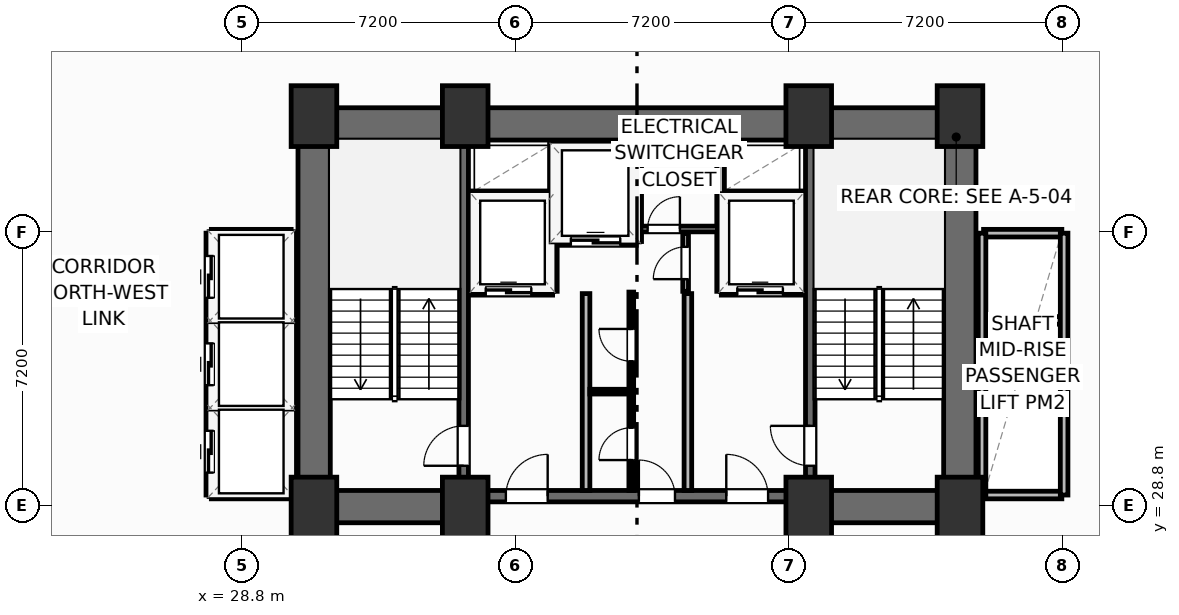
"""IFC4 building model, lengths in metres.
Left out: names, types, materials, properties, quantities, classifications, styles, units other than length and angle.
Written with IfcOpenShell. Run it as: python <this file> out.ifc"""

import sys

from ifc_helpers import new_model, si_unit, direction, frame, frame_2d, origin, origin_2d, place, context, subcontext, project, spatial, rectangle, extrude, element, fill, save


model = new_model("IFC4")
c1 = context("Model", 3, precision=1e-05, world=origin(), true_north=direction((0.0, 1.0)))
c2 = subcontext(c1, "Body", "Model", "MODEL_VIEW")
j1 = project(units=[si_unit("LENGTHUNIT", "METRE"), si_unit("PLANEANGLEUNIT", "RADIAN")], contexts=[c1])
p1 = place(None, origin())
s1 = spatial("IfcSite", under=j1, at=p1, CompositionType="ELEMENT")
p2 = place(p1, origin())
s2 = spatial("IfcBuilding", under=s1, at=p2, CompositionType="ELEMENT")
p3 = place(p2, frame((0.0, 0.0, 64.0)))
s3 = spatial("IfcBuildingStorey", under=s2, at=p3, CompositionType="ELEMENT", Elevation=64.0)
for number, where, z_axis, x_axis in (
    (1, (30.7, 28.75, 0.0), (0.0, 0.0, 1.0), (1.0, 0.0, 0.0)),
    (2, (34.68, 28.75, 0.0), (0.0, 0.0, 1.0), (1.0, 0.0, 0.0)),
    (3, (43.72, 28.75, 0.0), (0.0, 0.0, 1.0), (1.0, 0.0, 0.0)),
    (4, (47.7, 28.75, 0.0), (0.0, 0.0, 1.0), (1.0, 0.0, 0.0)),
    (5, (30.7, 39.05, 0.0), (0.0, 0.0, 1.0), (1.0, 0.0, 0.0)),
    (6, (34.68, 39.05, 0.0), (0.0, 0.0, 1.0), (1.0, 0.0, 0.0)),
    (7, (43.72, 39.05, 0.0), (0.0, 0.0, 1.0), (1.0, 0.0, 0.0)),
    (8, (47.7, 39.05, 0.0), (0.0, 0.0, 1.0), (1.0, 0.0, 0.0)),
):
    element("IfcColumn", number, at=place(p3, frame(where, z_axis=z_axis, x_axis=x_axis)), inside=s3, PredefinedType="COLUMN", context=c2, shape_type="SweptSolid", body=[
        extrude(rectangle(XDim=1.2, YDim=1.6, at=origin_2d()), origin(), (0.0, 0.0, 1.0), 3.7),
    ])
p4 = place(p3, frame((30.28, 38.845, 0.0), z_axis=(0.0, 0.0, 1.0), x_axis=(1.0, 0.0, 0.0)))
e9 = element("IfcWall", 9, at=p4, inside=s3, PredefinedType="SHEAR", context=c2, shape_type="SweptSolid", body=[
    extrude(rectangle(XDim=17.84, YDim=0.85, at=frame_2d((8.92, 0.0))), origin(), (0.0, 0.0, 1.0), 3.45),
])
for number, where, z_axis, x_axis in (
    (10, (30.705, 29.2, 0.0), (0.0, 0.0, 1.0), (0.0, 1.0, 0.0)),
    (11, (47.695, 29.2, 0.0), (0.0, 0.0, 1.0), (0.0, 1.0, 0.0)),
):
    element("IfcWall", number, at=place(p3, frame(where, z_axis=z_axis, x_axis=x_axis)), inside=s3, PredefinedType="SHEAR", context=c2, shape_type="SweptSolid", body=[
        extrude(rectangle(XDim=9.22, YDim=0.85, at=frame_2d((4.61, 0.0))), origin(), (0.0, 0.0, 1.0), 3.45),
    ])
for number, where, z_axis, x_axis in (
    (12, (30.28, 28.775, 0.0), (0.0, 0.0, 1.0), (1.0, 0.0, 0.0)),
    (13, (43.6, 28.775, 0.0), (0.0, 0.0, 1.0), (1.0, 0.0, 0.0)),
):
    element("IfcWall", number, at=place(p3, frame(where, z_axis=z_axis, x_axis=x_axis)), inside=s3, PredefinedType="SHEAR", context=c2, shape_type="SweptSolid", body=[
        extrude(rectangle(XDim=4.52, YDim=0.85, at=frame_2d((2.26, 0.0))), origin(), (0.0, 0.0, 1.0), 3.45),
    ])
p5 = place(p3, frame((34.8, 29.05, 0.0), z_axis=(0.0, 0.0, 1.0), x_axis=(1.0, 0.0, 0.0)))
e14 = element("IfcWall", 14, at=p5, inside=s3, PredefinedType="SHEAR", context=c2, shape_type="SweptSolid", body=[
    extrude(rectangle(XDim=8.8, YDim=0.3, at=frame_2d((4.4, 0.0))), origin(), (0.0, 0.0, 1.0), 3.45),
])
p6 = place(p5, frame((0.95, 0.0, 0.0)))
e15 = element("IfcOpeningElement", 15, at=p6, cuts=e14, PredefinedType="OPENING", context=c2, shape_type="SweptSolid", body=[
    extrude(rectangle(XDim=1.1, YDim=2.15, at=frame_2d((0.55, 1.075))), frame((0.0, 0.16, 0.0), z_axis=(0.0, -1.0, 0.0), x_axis=(1.0, 0.0, 0.0)), (0.0, 0.0, 1.0), 0.32),
])
p7 = place(p5, frame((6.75, 0.0, 0.0)))
e16 = element("IfcOpeningElement", 16, at=p7, cuts=e14, PredefinedType="OPENING", context=c2, shape_type="SweptSolid", body=[
    extrude(rectangle(XDim=1.1, YDim=2.15, at=frame_2d((0.55, 1.075))), frame((0.0, 0.16, 0.0), z_axis=(0.0, -1.0, 0.0), x_axis=(1.0, 0.0, 0.0)), (0.0, 0.0, 1.0), 0.32),
])
p8 = place(p5, frame((4.45, 0.0, 0.0)))
e17 = element("IfcOpeningElement", 17, at=p8, cuts=e14, PredefinedType="OPENING", context=c2, shape_type="SweptSolid", body=[
    extrude(rectangle(XDim=0.95, YDim=2.15, at=frame_2d((0.475, 1.075))), frame((0.0, 0.16, 0.0), z_axis=(0.0, -1.0, 0.0), x_axis=(1.0, 0.0, 0.0)), (0.0, 0.0, 1.0), 0.32),
])
p9 = place(p3, frame((34.64, 29.2, 0.0), z_axis=(0.0, 0.0, 1.0), x_axis=(0.0, 1.0, 0.0)))
e18 = element("IfcWall", 18, at=p9, inside=s3, PredefinedType="SHEAR", context=c2, shape_type="SweptSolid", body=[
    extrude(rectangle(XDim=9.22, YDim=0.25, at=frame_2d((4.61, 0.0))), origin(), (0.0, 0.0, 1.0), 3.45),
])
p10 = place(p9, frame((0.65, 0.0, 0.0)))
e19 = element("IfcOpeningElement", 19, at=p10, cuts=e18, PredefinedType="OPENING", context=c2, shape_type="SweptSolid", body=[
    extrude(rectangle(XDim=1.05, YDim=2.15, at=frame_2d((0.525, 1.075))), frame((0.0, 0.135, 0.0), z_axis=(0.0, -1.0, 0.0), x_axis=(1.0, 0.0, 0.0)), (0.0, 0.0, 1.0), 0.27),
])
p11 = place(p3, frame((43.76, 29.2, 0.0), z_axis=(0.0, 0.0, 1.0), x_axis=(0.0, 1.0, 0.0)))
e20 = element("IfcWall", 20, at=p11, inside=s3, PredefinedType="SHEAR", context=c2, shape_type="SweptSolid", body=[
    extrude(rectangle(XDim=9.22, YDim=0.25, at=frame_2d((4.61, 0.0))), origin(), (0.0, 0.0, 1.0), 3.45),
])
p12 = place(p11, frame((0.65, 0.0, 0.0)))
e21 = element("IfcOpeningElement", 21, at=p12, cuts=e20, PredefinedType="OPENING", context=c2, shape_type="SweptSolid", body=[
    extrude(rectangle(XDim=1.05, YDim=2.15, at=frame_2d((0.525, 1.075))), frame((0.0, 0.135, 0.0), z_axis=(0.0, -1.0, 0.0), x_axis=(1.0, 0.0, 0.0)), (0.0, 0.0, 1.0), 0.27),
])
for number, where, z_axis, x_axis in (
    (22, (37.86, 29.2, 0.0), (0.0, 0.0, 1.0), (0.0, 1.0, 0.0)),
    (23, (40.54, 29.2, 0.0), (0.0, 0.0, 1.0), (0.0, 1.0, 0.0)),
):
    element("IfcWall", number, at=place(p3, frame(where, z_axis=z_axis, x_axis=x_axis)), inside=s3, PredefinedType="PARTITIONING", context=c2, shape_type="SweptSolid", body=[
        extrude(rectangle(XDim=5.18, YDim=0.2, at=frame_2d((2.59, 0.0))), origin(), (0.0, 0.0, 1.0), 3.45),
    ])
p13 = place(p3, frame((34.8, 34.44, 0.0), z_axis=(0.0, 0.0, 1.0), x_axis=(1.0, 0.0, 0.0)))
e24 = element("IfcWall", 24, at=p13, inside=s3, PredefinedType="PARTITIONING", context=c2, shape_type="SweptSolid", body=[
    extrude(rectangle(XDim=2.18, YDim=0.2, at=frame_2d((1.09, 0.0))), origin(), (0.0, 0.0, 1.0), 3.45),
])
p14 = place(p13, frame((0.42, 0.0, 0.0)))
e25 = element("IfcOpeningElement", 25, at=p14, cuts=e24, PredefinedType="OPENING", context=c2, shape_type="SweptSolid", body=[
    extrude(rectangle(XDim=1.2, YDim=2.2, at=frame_2d((0.6, 1.1))), frame((0.0, 0.11, 0.0), z_axis=(0.0, -1.0, 0.0), x_axis=(1.0, 0.0, 0.0)), (0.0, 0.0, 1.0), 0.22),
])
p15 = place(p3, frame((34.8, 36.98, 0.0), z_axis=(0.0, 0.0, 1.0), x_axis=(1.0, 0.0, 0.0)))
e26 = element("IfcWall", 26, at=p15, inside=s3, PredefinedType="PARTITIONING", context=c2, shape_type="SweptSolid", body=[
    extrude(rectangle(XDim=2.18, YDim=0.2, at=frame_2d((1.09, 0.0))), origin(), (0.0, 0.0, 1.0), 3.45),
])
p16 = place(p3, frame((37.0, 34.44, 0.0), z_axis=(0.0, 0.0, 1.0), x_axis=(0.0, 1.0, 0.0)))
e27 = element("IfcWall", 27, at=p16, inside=s3, PredefinedType="PARTITIONING", context=c2, shape_type="SweptSolid", body=[
    extrude(rectangle(XDim=3.9, YDim=0.2, at=frame_2d((1.95, 0.0))), origin(), (0.0, 0.0, 1.0), 3.45),
])
p17 = place(p3, frame((41.42, 34.44, 0.0), z_axis=(0.0, 0.0, 1.0), x_axis=(1.0, 0.0, 0.0)))
e28 = element("IfcWall", 28, at=p17, inside=s3, PredefinedType="PARTITIONING", context=c2, shape_type="SweptSolid", body=[
    extrude(rectangle(XDim=2.18, YDim=0.2, at=frame_2d((1.09, 0.0))), origin(), (0.0, 0.0, 1.0), 3.45),
])
p18 = place(p17, frame((0.42, 0.0, 0.0)))
e29 = element("IfcOpeningElement", 29, at=p18, cuts=e28, PredefinedType="OPENING", context=c2, shape_type="SweptSolid", body=[
    extrude(rectangle(XDim=1.2, YDim=2.2, at=frame_2d((0.6, 1.1))), frame((0.0, 0.11, 0.0), z_axis=(0.0, -1.0, 0.0), x_axis=(1.0, 0.0, 0.0)), (0.0, 0.0, 1.0), 0.22),
])
p19 = place(p3, frame((41.42, 36.98, 0.0), z_axis=(0.0, 0.0, 1.0), x_axis=(1.0, 0.0, 0.0)))
e30 = element("IfcWall", 30, at=p19, inside=s3, PredefinedType="PARTITIONING", context=c2, shape_type="SweptSolid", body=[
    extrude(rectangle(XDim=2.18, YDim=0.2, at=frame_2d((1.09, 0.0))), origin(), (0.0, 0.0, 1.0), 3.45),
])
p20 = place(p3, frame((41.4, 34.44, 0.0), z_axis=(0.0, 0.0, 1.0), x_axis=(0.0, 1.0, 0.0)))
e31 = element("IfcWall", 31, at=p20, inside=s3, PredefinedType="PARTITIONING", context=c2, shape_type="SweptSolid", body=[
    extrude(rectangle(XDim=3.9, YDim=0.2, at=frame_2d((1.95, 0.0))), origin(), (0.0, 0.0, 1.0), 3.45),
])
p21 = place(p3, frame((37.06, 35.75, 0.0), z_axis=(0.0, 0.0, 1.0), x_axis=(1.0, 0.0, 0.0)))
e32 = element("IfcWall", 32, at=p21, inside=s3, PredefinedType="PARTITIONING", context=c2, shape_type="SweptSolid", body=[
    extrude(rectangle(XDim=2.12, YDim=0.2, at=frame_2d((1.06, 0.0))), origin(), (0.0, 0.0, 1.0), 3.45),
])
p22 = place(p21, frame((0.4, 0.0, 0.0)))
e33 = element("IfcOpeningElement", 33, at=p22, cuts=e32, PredefinedType="OPENING", context=c2, shape_type="SweptSolid", body=[
    extrude(rectangle(XDim=1.3, YDim=2.2, at=frame_2d((0.65, 1.1))), frame((0.0, 0.11, 0.0), z_axis=(0.0, -1.0, 0.0), x_axis=(1.0, 0.0, 0.0)), (0.0, 0.0, 1.0), 0.22),
])
p23 = place(p3, frame((39.22, 35.75, 0.0), z_axis=(0.0, 0.0, 1.0), x_axis=(0.0, 1.0, 0.0)))
e34 = element("IfcWall", 34, at=p23, inside=s3, PredefinedType="PARTITIONING", context=c2, shape_type="SweptSolid", body=[
    extrude(rectangle(XDim=2.59, YDim=0.2, at=frame_2d((1.295, 0.0))), origin(), (0.0, 0.0, 1.0), 3.45),
])
p24 = place(p3, frame((39.3, 36.08, 0.0), z_axis=(0.0, 0.0, 1.0), x_axis=(1.0, 0.0, 0.0)))
e35 = element("IfcWall", 35, at=p24, inside=s3, PredefinedType="PARTITIONING", context=c2, shape_type="SweptSolid", body=[
    extrude(rectangle(XDim=2.02, YDim=0.15, at=frame_2d((1.01, 0.0))), origin(), (0.0, 0.0, 1.0), 3.45),
])
p25 = place(p24, frame((0.18, 0.0, 0.0)))
e36 = element("IfcOpeningElement", 36, at=p25, cuts=e35, PredefinedType="OPENING", context=c2, shape_type="SweptSolid", body=[
    extrude(rectangle(XDim=0.85, YDim=2.05, at=frame_2d((0.425, 1.025))), frame((0.0, 0.085, 0.0), z_axis=(0.0, -1.0, 0.0), x_axis=(1.0, 0.0, 0.0)), (0.0, 0.0, 1.0), 0.17),
])
p26 = place(p3, frame((40.48, 34.44, 0.0), z_axis=(0.0, 0.0, 1.0), x_axis=(0.0, 1.0, 0.0)))
e37 = element("IfcWall", 37, at=p26, inside=s3, PredefinedType="PARTITIONING", context=c2, shape_type="SweptSolid", body=[
    extrude(rectangle(XDim=1.52, YDim=0.15, at=frame_2d((0.76, 0.0))), origin(), (0.0, 0.0, 1.0), 3.45),
])
p27 = place(p26, frame((0.32, 0.0, 0.0)))
e38 = element("IfcOpeningElement", 38, at=p27, cuts=e37, PredefinedType="OPENING", context=c2, shape_type="SweptSolid", body=[
    extrude(rectangle(XDim=0.85, YDim=2.05, at=frame_2d((0.425, 1.025))), frame((0.0, 0.085, 0.0), z_axis=(0.0, -1.0, 0.0), x_axis=(1.0, 0.0, 0.0)), (0.0, 0.0, 1.0), 0.17),
])
p28 = place(p3, frame((37.96, 31.8, 0.0), z_axis=(0.0, 0.0, 1.0), x_axis=(1.0, 0.0, 0.0)))
e39 = element("IfcWall", 39, at=p28, inside=s3, PredefinedType="PARTITIONING", context=c2, shape_type="SweptSolid", body=[
    extrude(rectangle(XDim=1.09, YDim=0.125, at=frame_2d((0.545, 0.0))), origin(), (0.0, 0.0, 1.0), 3.45),
])
p29 = place(p3, frame((39.05, 29.2, 0.0), z_axis=(0.0, 0.0, 1.0), x_axis=(0.0, 1.0, 0.0)))
e40 = element("IfcWall", 40, at=p29, inside=s3, PredefinedType="PARTITIONING", context=c2, shape_type="SweptSolid", body=[
    extrude(rectangle(XDim=5.22, YDim=0.125, at=frame_2d((2.61, 0.0))), origin(), (0.0, 0.0, 1.0), 3.45),
])
p30 = place(p29, frame((0.8, 0.0, 0.0)))
e41 = element("IfcOpeningElement", 41, at=p30, cuts=e40, PredefinedType="OPENING", context=c2, shape_type="SweptSolid", body=[
    extrude(rectangle(XDim=0.85, YDim=2.05, at=frame_2d((0.425, 1.025))), frame((0.0, 0.073, 0.0), z_axis=(0.0, -1.0, 0.0), x_axis=(1.0, 0.0, 0.0)), (0.0, 0.0, 1.0), 0.145),
])
p31 = place(p29, frame((3.4, 0.0, 0.0)))
e42 = element("IfcOpeningElement", 42, at=p31, cuts=e40, PredefinedType="OPENING", context=c2, shape_type="SweptSolid", body=[
    extrude(rectangle(XDim=0.85, YDim=2.05, at=frame_2d((0.425, 1.025))), frame((0.0, 0.073, 0.0), z_axis=(0.0, -1.0, 0.0), x_axis=(1.0, 0.0, 0.0)), (0.0, 0.0, 1.0), 0.145),
])
for number, where, z_axis, x_axis in (
    (43, (28.02, 31.375, 0.0), (0.0, 0.0, 1.0), (1.0, 0.0, 0.0)),
    (44, (28.02, 33.675, 0.0), (0.0, 0.0, 1.0), (1.0, 0.0, 0.0)),
):
    element("IfcWall", number, at=place(p3, frame(where, z_axis=z_axis, x_axis=x_axis)), inside=s3, PredefinedType="PARTITIONING", context=c2, shape_type="SweptSolid", body=[
        extrude(rectangle(XDim=2.06, YDim=0.2, at=frame_2d((1.03, 0.0))), origin(), (0.0, 0.0, 1.0), 3.45),
    ])
for number, where, z_axis, x_axis in (
    (45, (28.0, 29.08, 0.0), (0.0, 0.0, 1.0), (1.0, 0.0, 0.0)),
    (46, (28.0, 35.97, 0.0), (0.0, 0.0, 1.0), (1.0, 0.0, 0.0)),
):
    element("IfcWall", number, at=place(p3, frame(where, z_axis=z_axis, x_axis=x_axis)), inside=s3, PredefinedType="PARTITIONING", context=c2, shape_type="SweptSolid", body=[
        extrude(rectangle(XDim=2.1, YDim=0.2, at=frame_2d((1.05, 0.0))), origin(), (0.0, 0.0, 1.0), 3.45),
    ])
p32 = place(p3, frame((30.12, 29.08, 0.0), z_axis=(0.0, 0.0, 1.0), x_axis=(0.0, 1.0, 0.0)))
e47 = element("IfcWall", 47, at=p32, inside=s3, PredefinedType="PARTITIONING", context=c2, shape_type="SweptSolid", body=[
    extrude(rectangle(XDim=6.89, YDim=0.2, at=frame_2d((3.445, 0.0))), origin(), (0.0, 0.0, 1.0), 3.45),
])
p33 = place(p3, frame((27.96, 29.08, 0.0), z_axis=(0.0, 0.0, 1.0), x_axis=(0.0, 1.0, 0.0)))
e48 = element("IfcWall", 48, at=p33, inside=s3, PredefinedType="PARTITIONING", context=c2, shape_type="SweptSolid", body=[
    extrude(rectangle(XDim=6.89, YDim=0.2, at=frame_2d((3.445, 0.0))), origin(), (0.0, 0.0, 1.0), 3.45),
])
p34 = place(p33, frame((0.59, 0.0, 0.0)))
e49 = element("IfcOpeningElement", 49, at=p34, cuts=e48, PredefinedType="OPENING", context=c2, shape_type="SweptSolid", body=[
    extrude(rectangle(XDim=1.1, YDim=2.15, at=frame_2d((0.55, 1.075))), frame((0.0, 0.11, 0.0), z_axis=(0.0, -1.0, 0.0), x_axis=(1.0, 0.0, 0.0)), (0.0, 0.0, 1.0), 0.22),
])
p35 = place(p33, frame((2.89, 0.0, 0.0)))
e50 = element("IfcOpeningElement", 50, at=p35, cuts=e48, PredefinedType="OPENING", context=c2, shape_type="SweptSolid", body=[
    extrude(rectangle(XDim=1.1, YDim=2.15, at=frame_2d((0.55, 1.075))), frame((0.0, 0.11, 0.0), z_axis=(0.0, -1.0, 0.0), x_axis=(1.0, 0.0, 0.0)), (0.0, 0.0, 1.0), 0.22),
])
p36 = place(p33, frame((5.19, 0.0, 0.0)))
e51 = element("IfcOpeningElement", 51, at=p36, cuts=e48, PredefinedType="OPENING", context=c2, shape_type="SweptSolid", body=[
    extrude(rectangle(XDim=1.1, YDim=2.15, at=frame_2d((0.55, 1.075))), frame((0.0, 0.11, 0.0), z_axis=(0.0, -1.0, 0.0), x_axis=(1.0, 0.0, 0.0)), (0.0, 0.0, 1.0), 0.22),
])
for number, where, z_axis, x_axis in (
    (52, (48.32, 31.375, 0.0), (0.0, 0.0, 1.0), (1.0, 0.0, 0.0)),
    (53, (48.32, 33.675, 0.0), (0.0, 0.0, 1.0), (1.0, 0.0, 0.0)),
):
    element("IfcWall", number, at=place(p3, frame(where, z_axis=z_axis, x_axis=x_axis)), inside=s3, PredefinedType="PARTITIONING", context=c2, shape_type="SweptSolid", body=[
        extrude(rectangle(XDim=2.06, YDim=0.2, at=frame_2d((1.03, 0.0))), origin(), (0.0, 0.0, 1.0), 3.45),
    ])
p37 = place(p3, frame((48.32, 29.08, 0.0), z_axis=(0.0, 0.0, 1.0), x_axis=(1.0, 0.0, 0.0)))
e54 = element("IfcWall", 54, at=p37, inside=s3, PredefinedType="PARTITIONING", context=c2, shape_type="SweptSolid", body=[
    extrude(rectangle(XDim=2.06, YDim=0.2, at=frame_2d((1.03, 0.0))), origin(), (0.0, 0.0, 1.0), 2.662),
])
p38 = place(p3, frame((48.32, 35.97, 0.0), z_axis=(0.0, 0.0, 1.0), x_axis=(1.0, 0.0, 0.0)))
e55 = element("IfcWall", 55, at=p38, inside=s3, PredefinedType="PARTITIONING", context=c2, shape_type="SweptSolid", body=[
    extrude(rectangle(XDim=2.06, YDim=0.2, at=frame_2d((1.03, 0.0))), origin(), (0.0, 0.0, 1.0), 3.45),
])
for number, where, z_axis, x_axis in (
    (56, (48.28, 29.08, 0.0), (0.0, 0.0, 1.0), (0.0, 1.0, 0.0)),
    (57, (50.44, 29.08, 0.0), (0.0, 0.0, 1.0), (0.0, 1.0, 0.0)),
):
    element("IfcWall", number, at=place(p3, frame(where, z_axis=z_axis, x_axis=x_axis)), inside=s3, PredefinedType="PARTITIONING", context=c2, shape_type="SweptSolid", body=[
        extrude(rectangle(XDim=6.89, YDim=0.2, at=frame_2d((3.445, 0.0))), origin(), (0.0, 0.0, 1.0), 3.45),
    ])
p39 = place(p10, origin())
e58 = element("IfcDoor", 58, at=p39, inside=s3, OperationType="SINGLE_SWING_LEFT", PredefinedType="DOOR", context=c2, shape_type="SweptSolid", body=[
    extrude(rectangle(XDim=1.05, YDim=2.15, at=frame_2d((0.525, 1.075))), frame((0.0, 0.025, 0.0), z_axis=(0.0, -1.0, 0.0), x_axis=(1.0, 0.0, 0.0)), (0.0, 0.0, 1.0), 0.05),
])
fill(e19, e58)
p40 = place(p12, origin())
e59 = element("IfcDoor", 59, at=p40, inside=s3, OperationType="SINGLE_SWING_RIGHT", PredefinedType="DOOR", context=c2, shape_type="SweptSolid", body=[
    extrude(rectangle(XDim=1.05, YDim=2.15, at=frame_2d((0.525, 1.075))), frame((0.0, 0.025, 0.0), z_axis=(0.0, -1.0, 0.0), x_axis=(1.0, 0.0, 0.0)), (0.0, 0.0, 1.0), 0.05),
])
fill(e21, e59)
p41 = place(p6, origin())
e60 = element("IfcDoor", 60, at=p41, inside=s3, OperationType="SINGLE_SWING_RIGHT", PredefinedType="DOOR", context=c2, shape_type="SweptSolid", body=[
    extrude(rectangle(XDim=1.1, YDim=2.15, at=frame_2d((0.55, 1.075))), frame((0.0, 0.025, 0.0), z_axis=(0.0, -1.0, 0.0), x_axis=(1.0, 0.0, 0.0)), (0.0, 0.0, 1.0), 0.05),
])
fill(e15, e60)
p42 = place(p7, origin())
e61 = element("IfcDoor", 61, at=p42, inside=s3, OperationType="SINGLE_SWING_LEFT", PredefinedType="DOOR", context=c2, shape_type="SweptSolid", body=[
    extrude(rectangle(XDim=1.1, YDim=2.15, at=frame_2d((0.55, 1.075))), frame((0.0, 0.025, 0.0), z_axis=(0.0, -1.0, 0.0), x_axis=(1.0, 0.0, 0.0)), (0.0, 0.0, 1.0), 0.05),
])
fill(e16, e61)
p43 = place(p14, origin())
e62 = element("IfcDoor", 62, at=p43, inside=s3, OperationType="SLIDING_TO_LEFT", PredefinedType="DOOR", context=c2, shape_type="SweptSolid", body=[
    extrude(rectangle(XDim=1.2, YDim=2.2, at=frame_2d((0.6, 1.1))), frame((0.0, 0.025, 0.0), z_axis=(0.0, -1.0, 0.0), x_axis=(1.0, 0.0, 0.0)), (0.0, 0.0, 1.0), 0.05),
])
fill(e25, e62)
p44 = place(p18, origin())
e63 = element("IfcDoor", 63, at=p44, inside=s3, OperationType="SLIDING_TO_LEFT", PredefinedType="DOOR", context=c2, shape_type="SweptSolid", body=[
    extrude(rectangle(XDim=1.2, YDim=2.2, at=frame_2d((0.6, 1.1))), frame((0.0, 0.025, 0.0), z_axis=(0.0, -1.0, 0.0), x_axis=(1.0, 0.0, 0.0)), (0.0, 0.0, 1.0), 0.05),
])
fill(e29, e63)
p45 = place(p22, origin())
e64 = element("IfcDoor", 64, at=p45, inside=s3, OperationType="SLIDING_TO_LEFT", PredefinedType="DOOR", context=c2, shape_type="SweptSolid", body=[
    extrude(rectangle(XDim=1.3, YDim=2.2, at=frame_2d((0.65, 1.1))), frame((0.0, 0.025, 0.0), z_axis=(0.0, -1.0, 0.0), x_axis=(1.0, 0.0, 0.0)), (0.0, 0.0, 1.0), 0.05),
])
fill(e33, e64)
p46 = place(p25, origin())
e65 = element("IfcDoor", 65, at=p46, inside=s3, OperationType="SINGLE_SWING_RIGHT", PredefinedType="DOOR", context=c2, shape_type="SweptSolid", body=[
    extrude(rectangle(XDim=0.85, YDim=2.05, at=frame_2d((0.425, 1.025))), frame((0.0, 0.025, 0.0), z_axis=(0.0, -1.0, 0.0), x_axis=(1.0, 0.0, 0.0)), (0.0, 0.0, 1.0), 0.05),
])
fill(e36, e65)
p47 = place(p27, origin())
e66 = element("IfcDoor", 66, at=p47, inside=s3, OperationType="SINGLE_SWING_LEFT", PredefinedType="DOOR", context=c2, shape_type="SweptSolid", body=[
    extrude(rectangle(XDim=0.85, YDim=2.05, at=frame_2d((0.425, 1.025))), frame((0.0, 0.025, 0.0), z_axis=(0.0, -1.0, 0.0), x_axis=(1.0, 0.0, 0.0)), (0.0, 0.0, 1.0), 0.05),
])
fill(e38, e66)
p48 = place(p30, origin())
e67 = element("IfcDoor", 67, at=p48, inside=s3, OperationType="SINGLE_SWING_LEFT", PredefinedType="DOOR", context=c2, shape_type="SweptSolid", body=[
    extrude(rectangle(XDim=0.85, YDim=2.05, at=frame_2d((0.425, 1.025))), frame((0.0, 0.025, 0.0), z_axis=(0.0, -1.0, 0.0), x_axis=(1.0, 0.0, 0.0)), (0.0, 0.0, 1.0), 0.05),
])
fill(e41, e67)
p49 = place(p31, origin())
e68 = element("IfcDoor", 68, at=p49, inside=s3, OperationType="SINGLE_SWING_RIGHT", PredefinedType="DOOR", context=c2, shape_type="SweptSolid", body=[
    extrude(rectangle(XDim=0.85, YDim=2.05, at=frame_2d((0.425, 1.025))), frame((0.0, 0.025, 0.0), z_axis=(0.0, -1.0, 0.0), x_axis=(1.0, 0.0, 0.0)), (0.0, 0.0, 1.0), 0.05),
])
fill(e42, e68)
p50 = place(p8, origin())
e69 = element("IfcDoor", 69, at=p50, inside=s3, OperationType="SINGLE_SWING_LEFT", PredefinedType="DOOR", context=c2, shape_type="SweptSolid", body=[
    extrude(rectangle(XDim=0.95, YDim=2.15, at=frame_2d((0.475, 1.075))), frame((0.0, 0.025, 0.0), z_axis=(0.0, -1.0, 0.0), x_axis=(1.0, 0.0, 0.0)), (0.0, 0.0, 1.0), 0.05),
])
fill(e17, e69)
p51 = place(p34, origin())
e70 = element("IfcDoor", 70, at=p51, inside=s3, OperationType="SLIDING_TO_LEFT", PredefinedType="DOOR", context=c2, shape_type="SweptSolid", body=[
    extrude(rectangle(XDim=1.1, YDim=2.15, at=frame_2d((0.55, 1.075))), frame((0.0, 0.025, 0.0), z_axis=(0.0, -1.0, 0.0), x_axis=(1.0, 0.0, 0.0)), (0.0, 0.0, 1.0), 0.05),
])
fill(e49, e70)
p52 = place(p35, origin())
e71 = element("IfcDoor", 71, at=p52, inside=s3, OperationType="SLIDING_TO_LEFT", PredefinedType="DOOR", context=c2, shape_type="SweptSolid", body=[
    extrude(rectangle(XDim=1.1, YDim=2.15, at=frame_2d((0.55, 1.075))), frame((0.0, 0.025, 0.0), z_axis=(0.0, -1.0, 0.0), x_axis=(1.0, 0.0, 0.0)), (0.0, 0.0, 1.0), 0.05),
])
fill(e50, e71)
p53 = place(p36, origin())
e72 = element("IfcDoor", 72, at=p53, inside=s3, OperationType="SLIDING_TO_LEFT", PredefinedType="DOOR", context=c2, shape_type="SweptSolid", body=[
    extrude(rectangle(XDim=1.1, YDim=2.15, at=frame_2d((0.55, 1.075))), frame((0.0, 0.025, 0.0), z_axis=(0.0, -1.0, 0.0), x_axis=(1.0, 0.0, 0.0)), (0.0, 0.0, 1.0), 0.05),
])
fill(e51, e72)
save(model, sys.argv[1])
